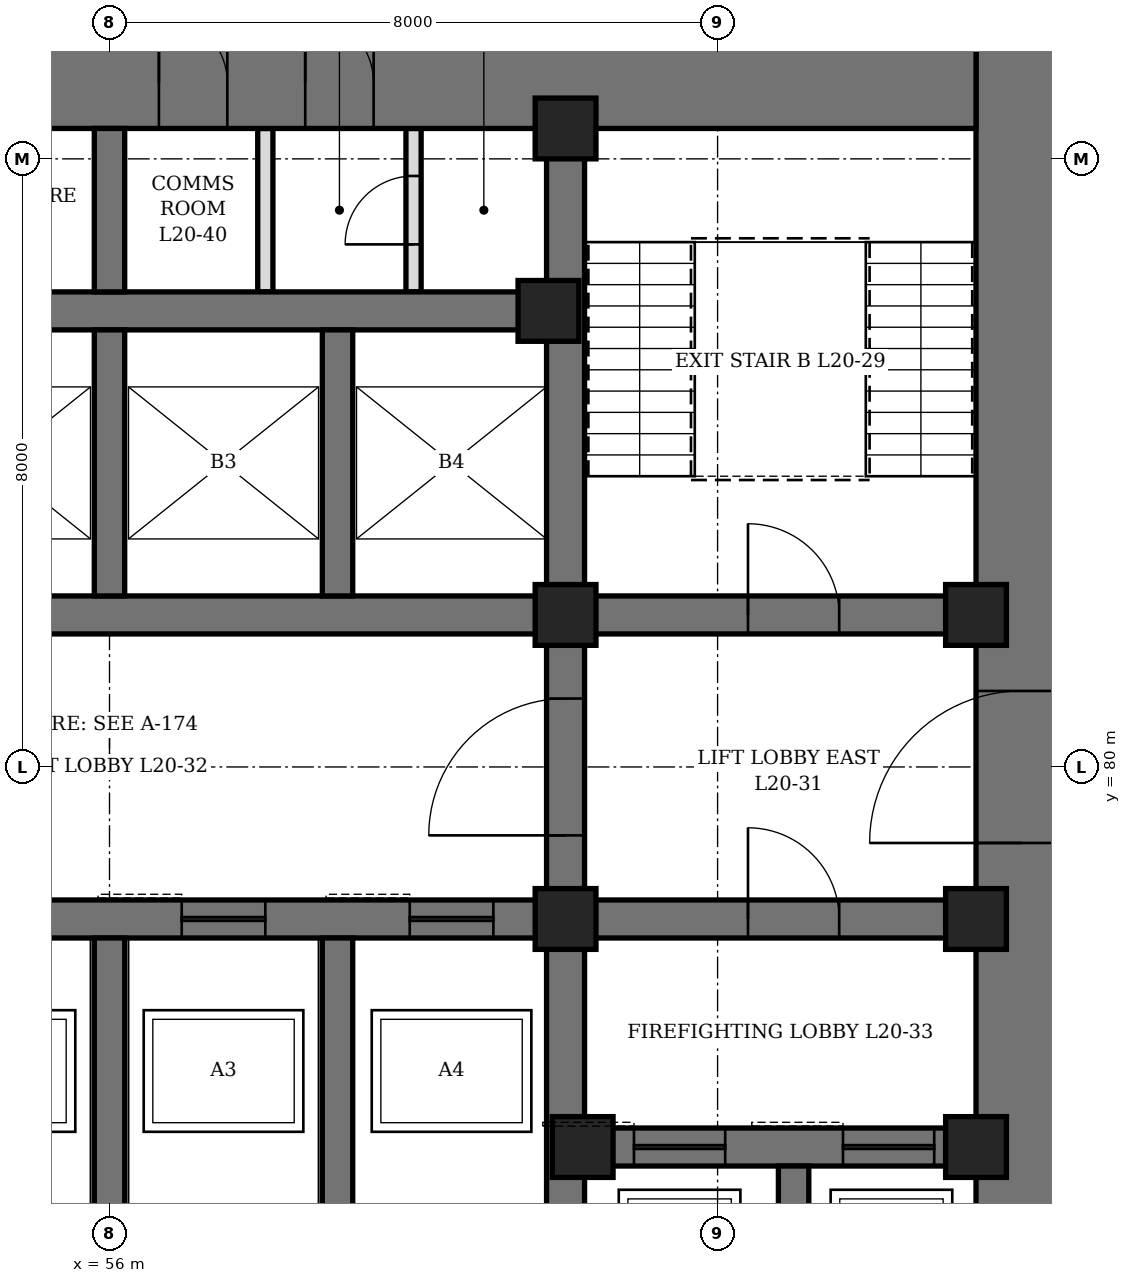
"""IFC4 building model, lengths in metres.
Left out: names, types, materials, properties, quantities, classifications, styles, units other than length and angle.
Written with IfcOpenShell. Run it as: python <this file> out.ifc"""

import sys

from ifc_helpers import new_model, si_unit, direction, frame, frame_2d, origin, origin_2d, place, context, subcontext, project, spatial, rectangle, hollow_rectangle, extrude, element, fill, save


model = new_model("IFC4")
c1 = context("Model", 3, precision=1e-05, world=origin(), true_north=direction((0.0, 1.0)))
c2 = subcontext(c1, "Body", "Model", "MODEL_VIEW")
j1 = project(units=[si_unit("LENGTHUNIT", "METRE"), si_unit("PLANEANGLEUNIT", "RADIAN")], contexts=[c1])
p1 = place(None, origin())
s1 = spatial("IfcSite", under=j1, at=p1, CompositionType="ELEMENT")
p2 = place(p1, origin())
s2 = spatial("IfcBuilding", under=s1, at=p2, CompositionType="ELEMENT")
p3 = place(p2, frame((0.0, 0.0, 93.7)))
s3 = spatial("IfcBuildingStorey", under=s2, at=p3, CompositionType="ELEMENT", Elevation=93.7)
p4 = place(p3, frame((68.0, 70.4, 0.0), z_axis=(0.0, 0.0, 1.0), x_axis=(0.0, 1.0, 0.0)))
e1 = element("IfcWall", 1, at=p4, inside=s3, PredefinedType="SHEAR", context=c2, shape_type="SweptSolid", body=[
    extrude(rectangle(XDim=19.2, YDim=1.2, at=frame_2d((9.6, 0.0))), origin(), (0.0, 0.0, 1.0), 4.2),
])
p5 = place(p4, frame((8.6, 0.0, 0.0)))
e2 = element("IfcOpeningElement", 2, at=p5, cuts=e1, PredefinedType="OPENING", context=c2, shape_type="SweptSolid", body=[
    extrude(rectangle(XDim=2.0, YDim=2.4, at=frame_2d((1.0, 1.2))), frame((0.0, 0.61, 0.0), z_axis=(0.0, -1.0, 0.0), x_axis=(1.0, 0.0, 0.0)), (0.0, 0.0, 1.0), 1.22),
])
p6 = place(p3, frame((44.6, 89.0, 0.0), z_axis=(0.0, 0.0, 1.0), x_axis=(1.0, 0.0, 0.0)))
e3 = element("IfcWall", 3, at=p6, inside=s3, PredefinedType="SHEAR", context=c2, shape_type="SweptSolid", body=[
    extrude(rectangle(XDim=22.8, YDim=1.2, at=frame_2d((11.4, 0.0))), origin(), (0.0, 0.0, 1.0), 4.2),
])
p7 = place(p6, frame((6.35, 0.0, 0.0)))
e4 = element("IfcOpeningElement", 4, at=p7, cuts=e3, PredefinedType="OPENING", context=c2, shape_type="SweptSolid", body=[
    extrude(rectangle(XDim=1.0, YDim=2.1, at=frame_2d((0.5, 1.05))), frame((0.0, 0.61, 0.0), z_axis=(0.0, -1.0, 0.0), x_axis=(1.0, 0.0, 0.0)), (0.0, 0.0, 1.0), 1.22),
])
p8 = place(p6, frame((9.25, 0.0, 0.0)))
e5 = element("IfcOpeningElement", 5, at=p8, cuts=e3, PredefinedType="OPENING", context=c2, shape_type="SweptSolid", body=[
    extrude(rectangle(XDim=0.9, YDim=2.1, at=frame_2d((0.45, 1.05))), frame((0.0, 0.61, 0.0), z_axis=(0.0, -1.0, 0.0), x_axis=(1.0, 0.0, 0.0)), (0.0, 0.0, 1.0), 1.22),
])
p9 = place(p6, frame((12.05, 0.0, 0.0)))
e6 = element("IfcOpeningElement", 6, at=p9, cuts=e3, PredefinedType="OPENING", context=c2, shape_type="SweptSolid", body=[
    extrude(rectangle(XDim=0.9, YDim=2.1, at=frame_2d((0.45, 1.05))), frame((0.0, 0.61, 0.0), z_axis=(0.0, -1.0, 0.0), x_axis=(1.0, 0.0, 0.0)), (0.0, 0.0, 1.0), 1.22),
])
p10 = place(p6, frame((13.975, 0.0, 0.0)))
e7 = element("IfcOpeningElement", 7, at=p10, cuts=e3, PredefinedType="OPENING", context=c2, shape_type="SweptSolid", body=[
    extrude(rectangle(XDim=0.9, YDim=2.1, at=frame_2d((0.45, 1.05))), frame((0.0, 0.61, 0.0), z_axis=(0.0, -1.0, 0.0), x_axis=(1.0, 0.0, 0.0)), (0.0, 0.0, 1.0), 1.22),
])
p11 = place(p3, frame((62.0, 71.6, 0.0), z_axis=(0.0, 0.0, 1.0), x_axis=(0.0, 1.0, 0.0)))
e8 = element("IfcWall", 8, at=p11, inside=s3, PredefinedType="SHEAR", context=c2, shape_type="SweptSolid", body=[
    extrude(rectangle(XDim=16.8, YDim=0.5, at=frame_2d((8.4, 0.0))), origin(), (0.0, 0.0, 1.0), 4.2),
])
p12 = place(p11, frame((7.5, 0.0, 0.0)))
e9 = element("IfcOpeningElement", 9, at=p12, cuts=e8, PredefinedType="OPENING", context=c2, shape_type="SweptSolid", body=[
    extrude(rectangle(XDim=1.8, YDim=2.4, at=frame_2d((0.9, 1.2))), frame((0.0, 0.26, 0.0), z_axis=(0.0, -1.0, 0.0), x_axis=(1.0, 0.0, 0.0)), (0.0, 0.0, 1.0), 0.52),
])
p13 = place(p3, frame((62.25, 75.0, 0.0), z_axis=(0.0, 0.0, 1.0), x_axis=(1.0, 0.0, 0.0)))
e10 = element("IfcWall", 10, at=p13, inside=s3, PredefinedType="SHEAR", context=c2, shape_type="SweptSolid", body=[
    extrude(rectangle(XDim=5.15, YDim=0.5, at=frame_2d((2.575, 0.0))), origin(), (0.0, 0.0, 1.0), 4.2),
])
p14 = place(p13, frame((0.65, 0.0, 0.0)))
e11 = element("IfcOpeningElement", 11, at=p14, cuts=e10, PredefinedType="OPENING", context=c2, shape_type="SweptSolid", body=[
    extrude(rectangle(XDim=1.2, YDim=2.2, at=frame_2d((0.6, 1.1))), frame((0.0, 0.26, 0.0), z_axis=(0.0, -1.0, 0.0), x_axis=(1.0, 0.0, 0.0)), (0.0, 0.0, 1.0), 0.52),
])
p15 = place(p13, frame((3.4, 0.0, 0.0)))
e12 = element("IfcOpeningElement", 12, at=p15, cuts=e10, PredefinedType="OPENING", context=c2, shape_type="SweptSolid", body=[
    extrude(rectangle(XDim=1.2, YDim=2.2, at=frame_2d((0.6, 1.1))), frame((0.0, 0.26, 0.0), z_axis=(0.0, -1.0, 0.0), x_axis=(1.0, 0.0, 0.0)), (0.0, 0.0, 1.0), 0.52),
])
p16 = place(p3, frame((62.25, 78.0, 0.0), z_axis=(0.0, 0.0, 1.0), x_axis=(1.0, 0.0, 0.0)))
e13 = element("IfcWall", 13, at=p16, inside=s3, PredefinedType="SHEAR", context=c2, shape_type="SweptSolid", body=[
    extrude(rectangle(XDim=5.15, YDim=0.5, at=frame_2d((2.575, 0.0))), origin(), (0.0, 0.0, 1.0), 4.2),
])
p17 = place(p16, frame((2.15, 0.0, 0.0)))
e14 = element("IfcOpeningElement", 14, at=p17, cuts=e13, PredefinedType="OPENING", context=c2, shape_type="SweptSolid", body=[
    extrude(rectangle(XDim=1.2, YDim=2.1, at=frame_2d((0.6, 1.05))), frame((0.0, 0.26, 0.0), z_axis=(0.0, -1.0, 0.0), x_axis=(1.0, 0.0, 0.0)), (0.0, 0.0, 1.0), 0.52),
])
p18 = place(p3, frame((62.25, 82.0, 0.0), z_axis=(0.0, 0.0, 1.0), x_axis=(1.0, 0.0, 0.0)))
e15 = element("IfcWall", 15, at=p18, inside=s3, PredefinedType="SHEAR", context=c2, shape_type="SweptSolid", body=[
    extrude(rectangle(XDim=5.15, YDim=0.5, at=frame_2d((2.575, 0.0))), origin(), (0.0, 0.0, 1.0), 4.2),
])
p19 = place(p18, frame((2.15, 0.0, 0.0)))
e16 = element("IfcOpeningElement", 16, at=p19, cuts=e15, PredefinedType="OPENING", context=c2, shape_type="SweptSolid", body=[
    extrude(rectangle(XDim=1.2, YDim=2.1, at=frame_2d((0.6, 1.05))), frame((0.0, 0.26, 0.0), z_axis=(0.0, -1.0, 0.0), x_axis=(1.0, 0.0, 0.0)), (0.0, 0.0, 1.0), 0.52),
])
p20 = place(p3, frame((50.25, 78.0, 0.0), z_axis=(0.0, 0.0, 1.0), x_axis=(1.0, 0.0, 0.0)))
e17 = element("IfcWall", 17, at=p20, inside=s3, PredefinedType="SHEAR", context=c2, shape_type="SweptSolid", body=[
    extrude(rectangle(XDim=11.5, YDim=0.5, at=frame_2d((5.75, 0.0))), origin(), (0.0, 0.0, 1.0), 4.2),
])
p21 = place(p20, frame((0.7, 0.0, 0.0)))
e18 = element("IfcOpeningElement", 18, at=p21, cuts=e17, PredefinedType="OPENING", context=c2, shape_type="SweptSolid", body=[
    extrude(rectangle(XDim=1.1, YDim=2.2, at=frame_2d((0.55, 1.1))), frame((0.0, 0.26, 0.0), z_axis=(0.0, -1.0, 0.0), x_axis=(1.0, 0.0, 0.0)), (0.0, 0.0, 1.0), 0.52),
])
p22 = place(p20, frame((3.7, 0.0, 0.0)))
e19 = element("IfcOpeningElement", 19, at=p22, cuts=e17, PredefinedType="OPENING", context=c2, shape_type="SweptSolid", body=[
    extrude(rectangle(XDim=1.1, YDim=2.2, at=frame_2d((0.55, 1.1))), frame((0.0, 0.26, 0.0), z_axis=(0.0, -1.0, 0.0), x_axis=(1.0, 0.0, 0.0)), (0.0, 0.0, 1.0), 0.52),
])
p23 = place(p20, frame((6.7, 0.0, 0.0)))
e20 = element("IfcOpeningElement", 20, at=p23, cuts=e17, PredefinedType="OPENING", context=c2, shape_type="SweptSolid", body=[
    extrude(rectangle(XDim=1.1, YDim=2.2, at=frame_2d((0.55, 1.1))), frame((0.0, 0.26, 0.0), z_axis=(0.0, -1.0, 0.0), x_axis=(1.0, 0.0, 0.0)), (0.0, 0.0, 1.0), 0.52),
])
p24 = place(p20, frame((9.7, 0.0, 0.0)))
e21 = element("IfcOpeningElement", 21, at=p24, cuts=e17, PredefinedType="OPENING", context=c2, shape_type="SweptSolid", body=[
    extrude(rectangle(XDim=1.1, YDim=2.2, at=frame_2d((0.55, 1.1))), frame((0.0, 0.26, 0.0), z_axis=(0.0, -1.0, 0.0), x_axis=(1.0, 0.0, 0.0)), (0.0, 0.0, 1.0), 0.52),
])
for number, where, z_axis, x_axis in (
    (22, (50.25, 82.0, 0.0), (0.0, 0.0, 1.0), (1.0, 0.0, 0.0)),
    (23, (50.25, 86.0, 0.0), (0.0, 0.0, 1.0), (1.0, 0.0, 0.0)),
):
    element("IfcWall", number, at=place(p3, frame(where, z_axis=z_axis, x_axis=x_axis)), inside=s3, PredefinedType="SHEAR", context=c2, shape_type="SweptSolid", body=[
        extrude(rectangle(XDim=11.5, YDim=0.5, at=frame_2d((5.75, 0.0))), origin(), (0.0, 0.0, 1.0), 4.2),
    ])
p25 = place(p3, frame((56.0, 74.2, 0.0), z_axis=(0.0, 0.0, 1.0), x_axis=(0.0, 1.0, 0.0)))
e24 = element("IfcWall", 24, at=p25, inside=s3, PredefinedType="SHEAR", context=c2, shape_type="SweptSolid", body=[
    extrude(rectangle(XDim=3.55, YDim=0.4, at=frame_2d((1.775, 0.0))), origin(), (0.0, 0.0, 1.0), 4.2),
])
p26 = place(p3, frame((56.0, 82.25, 0.0), z_axis=(0.0, 0.0, 1.0), x_axis=(0.0, 1.0, 0.0)))
e25 = element("IfcWall", 25, at=p26, inside=s3, PredefinedType="SHEAR", context=c2, shape_type="SweptSolid", body=[
    extrude(rectangle(XDim=3.5, YDim=0.4, at=frame_2d((1.75, 0.0))), origin(), (0.0, 0.0, 1.0), 4.2),
])
p27 = place(p3, frame((59.0, 74.2, 0.0), z_axis=(0.0, 0.0, 1.0), x_axis=(0.0, 1.0, 0.0)))
e26 = element("IfcWall", 26, at=p27, inside=s3, PredefinedType="SHEAR", context=c2, shape_type="SweptSolid", body=[
    extrude(rectangle(XDim=3.55, YDim=0.4, at=frame_2d((1.775, 0.0))), origin(), (0.0, 0.0, 1.0), 4.2),
])
p28 = place(p3, frame((59.0, 82.25, 0.0), z_axis=(0.0, 0.0, 1.0), x_axis=(0.0, 1.0, 0.0)))
e27 = element("IfcWall", 27, at=p28, inside=s3, PredefinedType="SHEAR", context=c2, shape_type="SweptSolid", body=[
    extrude(rectangle(XDim=3.5, YDim=0.4, at=frame_2d((1.75, 0.0))), origin(), (0.0, 0.0, 1.0), 4.2),
])
p29 = place(p3, frame((65.0, 71.6, 0.0), z_axis=(0.0, 0.0, 1.0), x_axis=(0.0, 1.0, 0.0)))
e28 = element("IfcWall", 28, at=p29, inside=s3, PredefinedType="SHEAR", context=c2, shape_type="SweptSolid", body=[
    extrude(rectangle(XDim=3.15, YDim=0.4, at=frame_2d((1.575, 0.0))), origin(), (0.0, 0.0, 1.0), 4.2),
])
p30 = place(p3, frame((56.0, 86.25, 0.0), z_axis=(0.0, 0.0, 1.0), x_axis=(0.0, 1.0, 0.0)))
e29 = element("IfcWall", 29, at=p30, inside=s3, PredefinedType="SHEAR", context=c2, shape_type="SweptSolid", body=[
    extrude(rectangle(XDim=2.15, YDim=0.4, at=frame_2d((1.075, 0.0))), origin(), (0.0, 0.0, 1.0), 4.2),
])
for number, where, z_axis, x_axis in (
    (30, (61.775, 86.0, 0.0), (0.0, 0.0, 1.0), (1.0, 0.0, 0.0)),
    (31, (62.0, 78.0, 0.0), (0.0, 0.0, 1.0), (1.0, 0.0, 0.0)),
    (32, (62.0, 82.0, 0.0), (0.0, 0.0, 1.0), (1.0, 0.0, 0.0)),
    (33, (62.0, 88.4, 0.0), (0.0, 0.0, 1.0), (1.0, 0.0, 0.0)),
    (34, (62.225, 75.0, 0.0), (0.0, 0.0, 1.0), (1.0, 0.0, 0.0)),
    (35, (67.4, 75.0, 0.0), (0.0, 0.0, 1.0), (1.0, 0.0, 0.0)),
    (36, (67.4, 78.0, 0.0), (0.0, 0.0, 1.0), (1.0, 0.0, 0.0)),
    (37, (67.4, 82.0, 0.0), (0.0, 0.0, 1.0), (1.0, 0.0, 0.0)),
):
    element("IfcColumn", number, at=place(p3, frame(where, z_axis=z_axis, x_axis=x_axis)), inside=s3, PredefinedType="COLUMN", context=c2, shape_type="SweptSolid", body=[
        extrude(hollow_rectangle(XDim=0.8, YDim=0.8, WallThickness=0.1, at=origin_2d()), origin(), (0.0, 0.0, 1.0), 4.2),
    ])
p31 = place(p3, frame((60.0, 86.25, 0.0), z_axis=(0.0, 0.0, 1.0), x_axis=(0.0, 1.0, 0.0)))
e38 = element("IfcWall", 38, at=p31, inside=s3, PredefinedType="PARTITIONING", context=c2, shape_type="SweptSolid", body=[
    extrude(rectangle(XDim=2.15, YDim=0.2, at=frame_2d((1.075, 0.0))), origin(), (0.0, 0.0, 1.0), 4.04),
])
p32 = place(p31, frame((0.625, 0.0, 0.0)))
e39 = element("IfcOpeningElement", 39, at=p32, cuts=e38, PredefinedType="OPENING", context=c2, shape_type="SweptSolid", body=[
    extrude(rectangle(XDim=0.9, YDim=2.1, at=frame_2d((0.45, 1.05))), frame((0.0, 0.11, 0.0), z_axis=(0.0, -1.0, 0.0), x_axis=(1.0, 0.0, 0.0)), (0.0, 0.0, 1.0), 0.22),
])
p33 = place(p3, frame((58.05, 86.25, 0.0), z_axis=(0.0, 0.0, 1.0), x_axis=(0.0, 1.0, 0.0)))
e40 = element("IfcWall", 40, at=p33, inside=s3, PredefinedType="PARTITIONING", context=c2, shape_type="SweptSolid", body=[
    extrude(rectangle(XDim=2.15, YDim=0.2, at=frame_2d((1.075, 0.0))), origin(), (0.0, 0.0, 1.0), 4.04),
])
p34 = place(p9, origin())
e41 = element("IfcDoor", 41, at=p34, inside=s3, OperationType="SINGLE_SWING_LEFT", PredefinedType="DOOR", context=c2, shape_type="SweptSolid", body=[
    extrude(rectangle(XDim=0.9, YDim=2.1, at=frame_2d((0.45, 1.05))), frame((0.0, 0.35, 0.0), z_axis=(0.0, -1.0, 0.0), x_axis=(1.0, 0.0, 0.0)), (0.0, 0.0, 1.0), 0.7),
])
fill(e6, e41)
p35 = place(p10, origin())
e42 = element("IfcDoor", 42, at=p35, inside=s3, OperationType="SINGLE_SWING_LEFT", PredefinedType="DOOR", context=c2, shape_type="SweptSolid", body=[
    extrude(rectangle(XDim=0.9, YDim=2.1, at=frame_2d((0.45, 1.05))), frame((0.0, 0.35, 0.0), z_axis=(0.0, -1.0, 0.0), x_axis=(1.0, 0.0, 0.0)), (0.0, 0.0, 1.0), 0.7),
])
fill(e7, e42)
p36 = place(p32, origin())
e43 = element("IfcDoor", 43, at=p36, inside=s3, OperationType="SINGLE_SWING_LEFT", PredefinedType="DOOR", context=c2, shape_type="SweptSolid", body=[
    extrude(rectangle(XDim=0.9, YDim=2.1, at=frame_2d((0.45, 1.05))), frame((0.0, 0.1, 0.0), z_axis=(0.0, -1.0, 0.0), x_axis=(1.0, 0.0, 0.0)), (0.0, 0.0, 1.0), 0.199),
])
fill(e39, e43)
p37 = place(p19, origin())
e44 = element("IfcDoor", 44, at=p37, inside=s3, OperationType="SINGLE_SWING_LEFT", PredefinedType="DOOR", context=c2, shape_type="SweptSolid", body=[
    extrude(rectangle(XDim=1.2, YDim=2.1, at=frame_2d((0.6, 1.05))), frame((0.0, 0.25, 0.0), z_axis=(0.0, -1.0, 0.0), x_axis=(1.0, 0.0, 0.0)), (0.0, 0.0, 1.0), 0.5),
])
fill(e16, e44)
p38 = place(p5, origin())
e45 = element("IfcDoor", 45, at=p38, inside=s3, OperationType="DOUBLE_DOOR_SINGLE_SWING", PredefinedType="DOOR", context=c2, shape_type="SweptSolid", body=[
    extrude(rectangle(XDim=2.0, YDim=2.4, at=frame_2d((1.0, 1.2))), frame((0.0, 0.35, 0.0), z_axis=(0.0, -1.0, 0.0), x_axis=(1.0, 0.0, 0.0)), (0.0, 0.0, 1.0), 0.7),
])
fill(e2, e45)
p39 = place(p12, origin())
e46 = element("IfcDoor", 46, at=p39, inside=s3, OperationType="DOUBLE_DOOR_SINGLE_SWING", PredefinedType="DOOR", context=c2, shape_type="SweptSolid", body=[
    extrude(rectangle(XDim=1.8, YDim=2.4, at=frame_2d((0.9, 1.2))), frame((0.0, 0.25, 0.0), z_axis=(0.0, -1.0, 0.0), x_axis=(1.0, 0.0, 0.0)), (0.0, 0.0, 1.0), 0.5),
])
fill(e9, e46)
p40 = place(p17, origin())
e47 = element("IfcDoor", 47, at=p40, inside=s3, OperationType="SINGLE_SWING_RIGHT", PredefinedType="DOOR", context=c2, shape_type="SweptSolid", body=[
    extrude(rectangle(XDim=1.2, YDim=2.1, at=frame_2d((0.6, 1.05))), frame((0.0, 0.25, 0.0), z_axis=(0.0, -1.0, 0.0), x_axis=(1.0, 0.0, 0.0)), (0.0, 0.0, 1.0), 0.5),
])
fill(e14, e47)
p41 = place(p23, origin())
e48 = element("IfcDoor", 48, at=p41, inside=s3, OperationType="SLIDING_TO_LEFT", PredefinedType="DOOR", context=c2, shape_type="SweptSolid", body=[
    extrude(rectangle(XDim=1.1, YDim=2.2, at=frame_2d((0.55, 1.1))), frame((0.0, 0.25, 0.0), z_axis=(0.0, -1.0, 0.0), x_axis=(1.0, 0.0, 0.0)), (0.0, 0.0, 1.0), 0.5),
])
fill(e20, e48)
p42 = place(p24, origin())
e49 = element("IfcDoor", 49, at=p42, inside=s3, OperationType="SLIDING_TO_LEFT", PredefinedType="DOOR", context=c2, shape_type="SweptSolid", body=[
    extrude(rectangle(XDim=1.1, YDim=2.2, at=frame_2d((0.55, 1.1))), frame((0.0, 0.25, 0.0), z_axis=(0.0, -1.0, 0.0), x_axis=(1.0, 0.0, 0.0)), (0.0, 0.0, 1.0), 0.5),
])
fill(e21, e49)
p43 = place(p14, origin())
e50 = element("IfcDoor", 50, at=p43, inside=s3, OperationType="SLIDING_TO_LEFT", PredefinedType="DOOR", context=c2, shape_type="SweptSolid", body=[
    extrude(rectangle(XDim=1.2, YDim=2.2, at=frame_2d((0.6, 1.1))), frame((0.0, 0.25, 0.0), z_axis=(0.0, -1.0, 0.0), x_axis=(1.0, 0.0, 0.0)), (0.0, 0.0, 1.0), 0.5),
])
fill(e11, e50)
p44 = place(p15, origin())
e51 = element("IfcDoor", 51, at=p44, inside=s3, OperationType="SLIDING_TO_LEFT", PredefinedType="DOOR", context=c2, shape_type="SweptSolid", body=[
    extrude(rectangle(XDim=1.2, YDim=2.2, at=frame_2d((0.6, 1.1))), frame((0.0, 0.25, 0.0), z_axis=(0.0, -1.0, 0.0), x_axis=(1.0, 0.0, 0.0)), (0.0, 0.0, 1.0), 0.5),
])
fill(e12, e51)
save(model, sys.argv[1])
